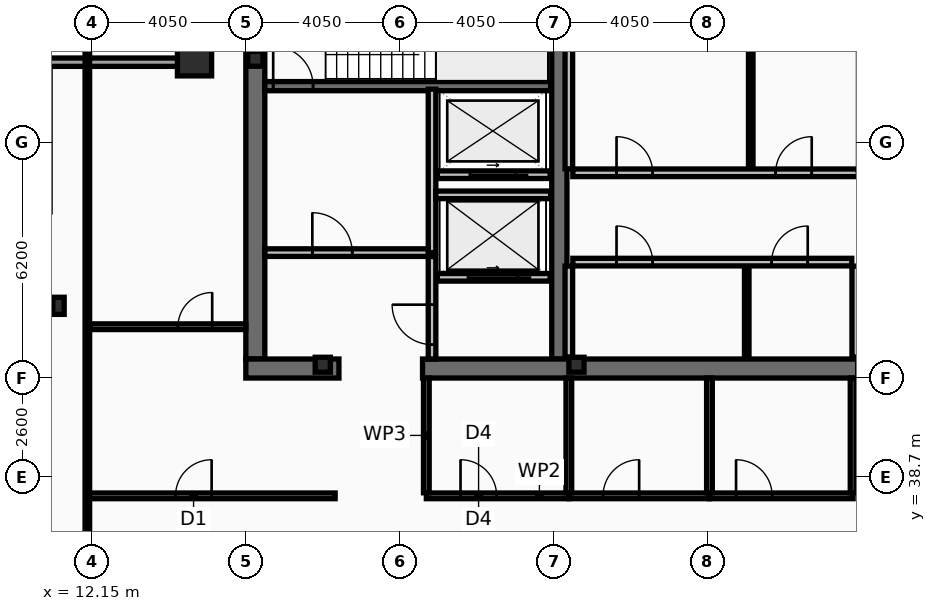
"""IFC4 building model, lengths in metres.
Left out: names, types, materials, properties, quantities, classifications, styles, units other than length and angle.
Written with IfcOpenShell. Run it as: python <this file> out.ifc"""

import sys

from ifc_helpers import new_model, si_unit, direction, frame, frame_2d, origin, origin_2d, place, context, subcontext, project, spatial, rectangle, hollow_rectangle, i_section, extrude, element, fill, save


model = new_model("IFC4")
c1 = context("Model", 3, precision=1e-05, world=origin(), true_north=direction((0.0, 1.0)))
c2 = subcontext(c1, "Body", "Model", "MODEL_VIEW")
j1 = project(units=[si_unit("LENGTHUNIT", "METRE"), si_unit("PLANEANGLEUNIT", "RADIAN")], contexts=[c1])
p1 = place(None, origin())
s1 = spatial("IfcSite", under=j1, at=p1, CompositionType="ELEMENT")
p2 = place(p1, origin())
s2 = spatial("IfcBuilding", under=s1, at=p2, CompositionType="ELEMENT")
p3 = place(p2, frame((0.0, 0.0, 314.6)))
s3 = spatial("IfcBuildingStorey", under=s2, at=p3, CompositionType="ELEMENT", Elevation=314.6)
p4 = place(p3, frame((16.45, 41.8, 0.0), z_axis=(0.0, 0.0, 1.0), x_axis=(0.0, 1.0, 0.0)))
e1 = element("IfcWall", 1, at=p4, inside=s3, PredefinedType="SHEAR", context=c2, shape_type="SweptSolid", body=[
    extrude(rectangle(XDim=11.4, YDim=0.5, at=frame_2d((5.7, 0.0))), origin(), (0.0, 0.0, 1.0), 3.44),
])
p5 = place(p3, frame((24.45, 41.8, 0.0), z_axis=(0.0, 0.0, 1.0), x_axis=(0.0, 1.0, 0.0)))
e2 = element("IfcWall", 2, at=p5, inside=s3, PredefinedType="SHEAR", context=c2, shape_type="SweptSolid", body=[
    extrude(rectangle(XDim=11.4, YDim=0.4, at=frame_2d((5.7, 0.0))), origin(), (0.0, 0.0, 1.0), 3.44),
])
p6 = place(p3, frame((18.65, 41.55, 0.0), z_axis=(0.0, 0.0, 1.0), x_axis=(-1.0, 0.0, 0.0)))
e3 = element("IfcWall", 3, at=p6, inside=s3, PredefinedType="SHEAR", context=c2, shape_type="SweptSolid", body=[
    extrude(rectangle(XDim=2.45, YDim=0.5, at=frame_2d((1.225, 0.0))), origin(), (0.0, 0.0, 1.0), 3.44),
])
p7 = place(p3, frame((32.3, 41.55, 0.0), z_axis=(0.0, 0.0, 1.0), x_axis=(-1.0, 0.0, 0.0)))
e4 = element("IfcWall", 4, at=p7, inside=s3, PredefinedType="SHEAR", context=c2, shape_type="SweptSolid", body=[
    extrude(rectangle(XDim=11.45, YDim=0.5, at=frame_2d((5.725, 0.0))), origin(), (0.0, 0.0, 1.0), 3.44),
])
p8 = place(p3, frame((16.7, 48.98, 0.0), z_axis=(0.0, 0.0, 1.0), x_axis=(1.0, 0.0, 0.0)))
e5 = element("IfcWall", 5, at=p8, inside=s3, PredefinedType="SHEAR", context=c2, shape_type="SweptSolid", body=[
    extrude(rectangle(XDim=7.52, YDim=0.24, at=frame_2d((3.76, 0.0))), origin(), (0.0, 0.0, 1.0), 3.44),
])
p9 = place(p8, frame((0.22, 0.0, 0.0)))
e6 = element("IfcOpeningElement", 6, at=p9, cuts=e5, PredefinedType="OPENING", context=c2, shape_type="SweptSolid", body=[
    extrude(rectangle(XDim=1.05, YDim=2.15, at=frame_2d((0.525, 1.075))), frame((0.0, 0.13, 0.0), z_axis=(0.0, -1.0, 0.0), x_axis=(1.0, 0.0, 0.0)), (0.0, 0.0, 1.0), 0.26),
])
p10 = place(p3, frame((14.85, 49.7, 0.0), z_axis=(0.0, 0.0, 1.0), x_axis=(1.0, 0.0, 0.0)))
e7 = element("IfcColumn", 7, at=p10, inside=s3, PredefinedType="COLUMN", context=c2, shape_type="SweptSolid", body=[
    extrude(hollow_rectangle(XDim=0.9, YDim=0.9, WallThickness=0.05, at=origin_2d()), origin(), (0.0, 0.0, 1.0), 3.6),
])
p11 = place(p3, frame((11.27, 43.2, 0.0), z_axis=(0.0, 0.0, 1.0), x_axis=(1.0, 0.0, 0.0)))
e8 = element("IfcColumn", 8, at=p11, inside=s3, PredefinedType="COLUMN", context=c2, shape_type="SweptSolid", body=[
    extrude(i_section(OverallWidth=0.3, OverallDepth=0.45, WebThickness=0.014, FlangeThickness=0.026, at=origin_2d()), origin(), (0.0, 0.0, 1.0), 3.6),
])
for number, where, z_axis, x_axis in (
    (9, (16.45, 49.7, 0.0), (0.0, 0.0, 1.0), (1.0, 0.0, 0.0)),
    (10, (18.225, 41.65, 0.0), (0.0, 0.0, 1.0), (1.0, 0.0, 0.0)),
    (11, (24.9, 41.65, 0.0), (0.0, 0.0, 1.0), (1.0, 0.0, 0.0)),
):
    element("IfcColumn", number, at=place(p3, frame(where, z_axis=z_axis, x_axis=x_axis)), inside=s3, PredefinedType="COLUMN", context=c2, shape_type="SweptSolid", body=[
        extrude(i_section(OverallWidth=0.399, OverallDepth=0.393, WebThickness=0.023, FlangeThickness=0.037, at=origin_2d()), origin(), (0.0, 0.0, 1.0), 3.6),
    ])
p12 = place(p3, frame((10.83, 49.61, 0.0), z_axis=(0.0, 0.0, 1.0), x_axis=(1.0, 0.0, 0.0)))
e12 = element("IfcWall", 12, at=p12, inside=s3, PredefinedType="SOLIDWALL", context=c2, shape_type="SweptSolid", body=[
    extrude(rectangle(XDim=4.22, YDim=0.22, at=frame_2d((2.11, 0.0))), origin(), (0.0, 0.0, 1.0), 2.88),
])
p13 = place(p3, frame((14.94, 49.72, 0.0), z_axis=(0.0, 0.0, 1.0), x_axis=(0.0, 1.0, 0.0)))
e13 = element("IfcWall", 13, at=p13, inside=s3, PredefinedType="SOLIDWALL", context=c2, shape_type="SweptSolid", body=[
    extrude(rectangle(XDim=3.91, YDim=0.22, at=frame_2d((1.955, 0.0))), origin(), (0.0, 0.0, 1.0), 2.88),
])
p14 = place(p3, frame((24.21, 43.95, 0.0), z_axis=(0.0, 0.0, 1.0), x_axis=(-1.0, 0.0, 0.0)))
e14 = element("IfcWall", 14, at=p14, inside=s3, PredefinedType="PARTITIONING", context=c2, shape_type="SweptSolid", body=[
    extrude(rectangle(XDim=2.97, YDim=0.2, at=frame_2d((1.485, 0.0))), origin(), (0.0, 0.0, 1.0), 3.44),
])
p15 = place(p14, frame((0.86, 0.0, 0.0)))
e15 = element("IfcOpeningElement", 15, at=p15, cuts=e14, PredefinedType="OPENING", context=c2, shape_type="SweptSolid", body=[
    extrude(rectangle(XDim=1.3, YDim=2.18, at=frame_2d((0.65, 1.09))), frame((0.0, 0.11, 0.0), z_axis=(0.0, -1.0, 0.0), x_axis=(1.0, 0.0, 0.0)), (0.0, 0.0, 1.0), 0.22),
])
p16 = place(p3, frame((24.21, 46.65, 0.0), z_axis=(0.0, 0.0, 1.0), x_axis=(-1.0, 0.0, 0.0)))
e16 = element("IfcWall", 16, at=p16, inside=s3, PredefinedType="PARTITIONING", context=c2, shape_type="SweptSolid", body=[
    extrude(rectangle(XDim=2.97, YDim=0.2, at=frame_2d((1.485, 0.0))), origin(), (0.0, 0.0, 1.0), 3.44),
])
p17 = place(p16, frame((0.91, 0.0, 0.0)))
e17 = element("IfcOpeningElement", 17, at=p17, cuts=e16, PredefinedType="OPENING", context=c2, shape_type="SweptSolid", body=[
    extrude(rectangle(XDim=1.2, YDim=2.18, at=frame_2d((0.6, 1.09))), frame((0.0, 0.11, 0.0), z_axis=(0.0, -1.0, 0.0), x_axis=(1.0, 0.0, 0.0)), (0.0, 0.0, 1.0), 0.22),
])
p18 = place(p3, frame((21.1, 44.6, 0.0), z_axis=(0.0, 0.0, 1.0), x_axis=(0.0, 1.0, 0.0)))
e18 = element("IfcWall", 18, at=p18, inside=s3, PredefinedType="PARTITIONING", context=c2, shape_type="SweptSolid", body=[
    extrude(rectangle(XDim=4.3, YDim=0.2, at=frame_2d((2.15, 0.0))), origin(), (0.0, 0.0, 1.0), 3.44),
])
p19 = place(p3, frame((16.7, 44.6, 0.0), z_axis=(0.0, 0.0, 1.0), x_axis=(1.0, 0.0, 0.0)))
e19 = element("IfcWall", 19, at=p19, inside=s3, PredefinedType="PARTITIONING", context=c2, shape_type="SweptSolid", body=[
    extrude(rectangle(XDim=4.3, YDim=0.2, at=frame_2d((2.15, 0.0))), origin(), (0.0, 0.0, 1.0), 3.44),
])
p20 = place(p19, frame((1.25, 0.0, 0.0)))
e20 = element("IfcOpeningElement", 20, at=p20, cuts=e19, PredefinedType="OPENING", context=c2, shape_type="SweptSolid", body=[
    extrude(rectangle(XDim=1.05, YDim=2.15, at=frame_2d((0.525, 1.075))), frame((0.0, 0.11, 0.0), z_axis=(0.0, -1.0, 0.0), x_axis=(1.0, 0.0, 0.0)), (0.0, 0.0, 1.0), 0.22),
])
p21 = place(p3, frame((21.2, 46.12, 0.0), z_axis=(0.0, 0.0, 1.0), x_axis=(1.0, 0.0, 0.0)))
e21 = element("IfcWall", 21, at=p21, inside=s3, PredefinedType="PARTITIONING", context=c2, shape_type="SweptSolid", body=[
    extrude(rectangle(XDim=3.02, YDim=0.2, at=frame_2d((1.51, 0.0))), origin(), (0.0, 0.0, 1.0), 3.44),
])
p22 = place(p3, frame((21.1, 41.8, 0.0), z_axis=(0.0, 0.0, 1.0), x_axis=(0.0, 1.0, 0.0)))
e22 = element("IfcWall", 22, at=p22, inside=s3, PredefinedType="PARTITIONING", context=c2, shape_type="SweptSolid", body=[
    extrude(rectangle(XDim=2.695, YDim=0.2, at=frame_2d((1.348, 0.0))), origin(), (0.0, 0.0, 1.0), 3.44),
])
p23 = place(p22, frame((0.38, 0.0, 0.0)))
e23 = element("IfcOpeningElement", 23, at=p23, cuts=e22, PredefinedType="OPENING", context=c2, shape_type="SweptSolid", body=[
    extrude(rectangle(XDim=1.05, YDim=2.15, at=frame_2d((0.525, 1.075))), frame((0.0, 0.11, 0.0), z_axis=(0.0, -1.0, 0.0), x_axis=(1.0, 0.0, 0.0)), (0.0, 0.0, 1.0), 0.22),
])
p24 = place(p3, frame((24.7, 46.805, 0.0), z_axis=(0.0, 0.0, 1.0), x_axis=(0.0, 1.0, 0.0)))
e24 = element("IfcWall", 24, at=p24, inside=s3, PredefinedType="PARTITIONING", context=c2, shape_type="SweptSolid", body=[
    extrude(rectangle(XDim=5.99, YDim=0.2, at=frame_2d((2.995, 0.0))), origin(), (0.0, 0.0, 1.0), 3.44),
])
p25 = place(p3, frame((29.486, 46.805, 0.0), z_axis=(0.0, 0.0, 1.0), x_axis=(0.0, 1.0, 0.0)))
e25 = element("IfcWall", 25, at=p25, inside=s3, PredefinedType="PARTITIONING", context=c2, shape_type="SweptSolid", body=[
    extrude(rectangle(XDim=5.99, YDim=0.12, at=frame_2d((2.995, 0.0))), origin(), (0.0, 0.0, 1.0), 3.44),
])
p26 = place(p3, frame((24.805, 46.7, 0.0), z_axis=(0.0, 0.0, 1.0), x_axis=(1.0, 0.0, 0.0)))
e26 = element("IfcWall", 26, at=p26, inside=s3, PredefinedType="PARTITIONING", context=c2, shape_type="SweptSolid", body=[
    extrude(rectangle(XDim=7.51, YDim=0.2, at=frame_2d((3.755, 0.0))), origin(), (0.0, 0.0, 1.0), 3.44),
])
p27 = place(p26, frame((1.15, 0.0, 0.0)))
e27 = element("IfcOpeningElement", 27, at=p27, cuts=e26, PredefinedType="OPENING", context=c2, shape_type="SweptSolid", body=[
    extrude(rectangle(XDim=0.95, YDim=2.1, at=frame_2d((0.475, 1.05))), frame((0.0, 0.11, 0.0), z_axis=(0.0, -1.0, 0.0), x_axis=(1.0, 0.0, 0.0)), (0.0, 0.0, 1.0), 0.22),
])
p28 = place(p26, frame((5.336, 0.0, 0.0)))
e28 = element("IfcOpeningElement", 28, at=p28, cuts=e26, PredefinedType="OPENING", context=c2, shape_type="SweptSolid", body=[
    extrude(rectangle(XDim=0.95, YDim=2.1, at=frame_2d((0.475, 1.05))), frame((0.0, 0.11, 0.0), z_axis=(0.0, -1.0, 0.0), x_axis=(1.0, 0.0, 0.0)), (0.0, 0.0, 1.0), 0.22),
])
for number, where, z_axis, x_axis in (
    (29, (24.7, 41.85, 0.0), (0.0, 0.0, 1.0), (0.0, 1.0, 0.0)),
    (30, (32.25, 41.85, 0.0), (0.0, 0.0, 1.0), (0.0, 1.0, 0.0)),
):
    element("IfcWall", number, at=place(p3, frame(where, z_axis=z_axis, x_axis=x_axis)), inside=s3, PredefinedType="PARTITIONING", context=c2, shape_type="SweptSolid", body=[
        extrude(rectangle(XDim=2.395, YDim=0.2, at=frame_2d((1.198, 0.0))), origin(), (0.0, 0.0, 1.0), 3.44),
    ])
p29 = place(p3, frame((29.381, 41.85, 0.0), z_axis=(0.0, 0.0, 1.0), x_axis=(0.0, 1.0, 0.0)))
e31 = element("IfcWall", 31, at=p29, inside=s3, PredefinedType="PARTITIONING", context=c2, shape_type="SweptSolid", body=[
    extrude(rectangle(XDim=2.395, YDim=0.12, at=frame_2d((1.198, 0.0))), origin(), (0.0, 0.0, 1.0), 3.44),
])
p30 = place(p3, frame((24.805, 44.35, 0.0), z_axis=(0.0, 0.0, 1.0), x_axis=(1.0, 0.0, 0.0)))
e32 = element("IfcWall", 32, at=p30, inside=s3, PredefinedType="PARTITIONING", context=c2, shape_type="SweptSolid", body=[
    extrude(rectangle(XDim=7.34, YDim=0.2, at=frame_2d((3.67, 0.0))), origin(), (0.0, 0.0, 1.0), 3.44),
])
p31 = place(p30, frame((1.15, 0.0, 0.0)))
e33 = element("IfcOpeningElement", 33, at=p31, cuts=e32, PredefinedType="OPENING", context=c2, shape_type="SweptSolid", body=[
    extrude(rectangle(XDim=0.95, YDim=2.1, at=frame_2d((0.475, 1.05))), frame((0.0, 0.11, 0.0), z_axis=(0.0, -1.0, 0.0), x_axis=(1.0, 0.0, 0.0)), (0.0, 0.0, 1.0), 0.22),
])
p32 = place(p30, frame((5.231, 0.0, 0.0)))
e34 = element("IfcOpeningElement", 34, at=p32, cuts=e32, PredefinedType="OPENING", context=c2, shape_type="SweptSolid", body=[
    extrude(rectangle(XDim=0.95, YDim=2.1, at=frame_2d((0.475, 1.05))), frame((0.0, 0.11, 0.0), z_axis=(0.0, -1.0, 0.0), x_axis=(1.0, 0.0, 0.0)), (0.0, 0.0, 1.0), 0.22),
])
p33 = place(p3, frame((20.95, 38.2, 0.0), z_axis=(0.0, 0.0, 1.0), x_axis=(1.0, 0.0, 0.0)))
e35 = element("IfcWall", 35, at=p33, inside=s3, PredefinedType="PARTITIONING", context=c2, shape_type="SweptSolid", body=[
    extrude(rectangle(XDim=3.75, YDim=0.15, at=frame_2d((1.875, 0.0))), origin(), (0.0, 0.0, 1.0), 2.83),
])
p34 = place(p33, frame((0.9, 0.0, 0.0)))
e36 = element("IfcOpeningElement", 36, at=p34, cuts=e35, PredefinedType="OPENING", context=c2, shape_type="SweptSolid", body=[
    extrude(rectangle(XDim=0.95, YDim=2.05, at=frame_2d((0.475, 1.025))), frame((0.0, 0.085, 0.0), z_axis=(0.0, -1.0, 0.0), x_axis=(1.0, 0.0, 0.0)), (0.0, 0.0, 1.0), 0.17),
])
p35 = place(p3, frame((24.7, 38.2, 0.0), z_axis=(0.0, 0.0, 1.0), x_axis=(1.0, 0.0, 0.0)))
e37 = element("IfcWall", 37, at=p35, inside=s3, PredefinedType="PARTITIONING", context=c2, shape_type="SweptSolid", body=[
    extrude(rectangle(XDim=3.7, YDim=0.15, at=frame_2d((1.85, 0.0))), origin(), (0.0, 0.0, 1.0), 2.83),
])
p36 = place(p35, frame((0.9, 0.0, 0.0)))
e38 = element("IfcOpeningElement", 38, at=p36, cuts=e37, PredefinedType="OPENING", context=c2, shape_type="SweptSolid", body=[
    extrude(rectangle(XDim=0.95, YDim=2.05, at=frame_2d((0.475, 1.025))), frame((0.0, 0.085, 0.0), z_axis=(0.0, -1.0, 0.0), x_axis=(1.0, 0.0, 0.0)), (0.0, 0.0, 1.0), 0.17),
])
p37 = place(p3, frame((28.4, 38.2, 0.0), z_axis=(0.0, 0.0, 1.0), x_axis=(1.0, 0.0, 0.0)))
e39 = element("IfcWall", 39, at=p37, inside=s3, PredefinedType="PARTITIONING", context=c2, shape_type="SweptSolid", body=[
    extrude(rectangle(XDim=3.78, YDim=0.15, at=frame_2d((1.89, 0.0))), origin(), (0.0, 0.0, 1.0), 3.44),
])
p38 = place(p37, frame((0.7, 0.0, 0.0)))
e40 = element("IfcOpeningElement", 40, at=p38, cuts=e39, PredefinedType="OPENING", context=c2, shape_type="SweptSolid", body=[
    extrude(rectangle(XDim=0.95, YDim=2.05, at=frame_2d((0.475, 1.025))), frame((0.0, 0.085, 0.0), z_axis=(0.0, -1.0, 0.0), x_axis=(1.0, 0.0, 0.0)), (0.0, 0.0, 1.0), 0.17),
])
p39 = place(p3, frame((20.95, 38.28, 0.0), z_axis=(0.0, 0.0, 1.0), x_axis=(0.0, 1.0, 0.0)))
e41 = element("IfcWall", 41, at=p39, inside=s3, PredefinedType="PARTITIONING", context=c2, shape_type="SweptSolid", body=[
    extrude(rectangle(XDim=3.02, YDim=0.15, at=frame_2d((1.51, 0.0))), origin(), (0.0, 0.0, 1.0), 3.44),
])
p40 = place(p3, frame((24.7, 38.28, 0.0), z_axis=(0.0, 0.0, 1.0), x_axis=(0.0, 1.0, 0.0)))
e42 = element("IfcWall", 42, at=p40, inside=s3, PredefinedType="PARTITIONING", context=c2, shape_type="SweptSolid", body=[
    extrude(rectangle(XDim=3.02, YDim=0.15, at=frame_2d((1.51, 0.0))), origin(), (0.0, 0.0, 1.0), 2.83),
])
for number, where, z_axis, x_axis in (
    (43, (28.4, 38.28, 0.0), (0.0, 0.0, 1.0), (0.0, 1.0, 0.0)),
    (44, (32.18, 38.28, 0.0), (0.0, 0.0, 1.0), (0.0, 1.0, 0.0)),
):
    element("IfcWall", number, at=place(p3, frame(where, z_axis=z_axis, x_axis=x_axis)), inside=s3, PredefinedType="PARTITIONING", context=c2, shape_type="SweptSolid", body=[
        extrude(rectangle(XDim=3.02, YDim=0.15, at=frame_2d((1.51, 0.0))), origin(), (0.0, 0.0, 1.0), 3.44),
    ])
p41 = place(p3, frame((12.03, 38.2, 0.0), z_axis=(0.0, 0.0, 1.0), x_axis=(1.0, 0.0, 0.0)))
e45 = element("IfcWall", 45, at=p41, inside=s3, PredefinedType="PARTITIONING", context=c2, shape_type="SweptSolid", body=[
    extrude(rectangle(XDim=6.52, YDim=0.15, at=frame_2d((3.26, 0.0))), origin(), (0.0, 0.0, 1.0), 2.83),
])
p42 = place(p41, frame((2.32, 0.0, 0.0)))
e46 = element("IfcOpeningElement", 46, at=p42, cuts=e45, PredefinedType="OPENING", context=c2, shape_type="SweptSolid", body=[
    extrude(rectangle(XDim=0.95, YDim=2.05, at=frame_2d((0.475, 1.025))), frame((0.0, 0.085, 0.0), z_axis=(0.0, -1.0, 0.0), x_axis=(1.0, 0.0, 0.0)), (0.0, 0.0, 1.0), 0.17),
])
p43 = place(p3, frame((12.095, 42.65, 0.0), z_axis=(0.0, 0.0, 1.0), x_axis=(1.0, 0.0, 0.0)))
e47 = element("IfcWall", 47, at=p43, inside=s3, PredefinedType="PARTITIONING", context=c2, shape_type="SweptSolid", body=[
    extrude(rectangle(XDim=4.105, YDim=0.15, at=frame_2d((2.052, 0.0))), origin(), (0.0, 0.0, 1.0), 2.83),
])
p44 = place(p43, frame((2.32, 0.0, 0.0)))
e48 = element("IfcOpeningElement", 48, at=p44, cuts=e47, PredefinedType="OPENING", context=c2, shape_type="SweptSolid", body=[
    extrude(rectangle(XDim=0.9, YDim=2.05, at=frame_2d((0.45, 1.025))), frame((0.0, 0.085, 0.0), z_axis=(0.0, -1.0, 0.0), x_axis=(1.0, 0.0, 0.0)), (0.0, 0.0, 1.0), 0.17),
])
p45 = place(p3, frame((12.03, 10.665, 0.0), z_axis=(0.0, 0.0, 1.0), x_axis=(0.0, 1.0, 0.0)))
e49 = element("IfcWall", 49, at=p45, inside=s3, PredefinedType="PARTITIONING", context=c2, shape_type="SweptSolid", body=[
    extrude(rectangle(XDim=42.11, YDim=0.12, at=frame_2d((21.055, 0.0))), origin(), (0.0, 0.0, 1.0), 2.83),
])
p46 = place(p9, origin())
e50 = element("IfcDoor", 50, at=p46, inside=s3, OperationType="SINGLE_SWING_LEFT", PredefinedType="DOOR", context=c2, shape_type="SweptSolid", body=[
    extrude(rectangle(XDim=1.05, YDim=2.15, at=frame_2d((0.525, 1.075))), frame((0.0, 0.025, 0.0), z_axis=(0.0, -1.0, 0.0), x_axis=(1.0, 0.0, 0.0)), (0.0, 0.0, 1.0), 0.05),
])
fill(e6, e50)
p47 = place(p15, origin())
e51 = element("IfcDoor", 51, at=p47, inside=s3, OperationType="SLIDING_TO_LEFT", PredefinedType="DOOR", context=c2, shape_type="SweptSolid", body=[
    extrude(rectangle(XDim=1.3, YDim=2.18, at=frame_2d((0.65, 1.09))), frame((0.0, 0.025, 0.0), z_axis=(0.0, -1.0, 0.0), x_axis=(1.0, 0.0, 0.0)), (0.0, 0.0, 1.0), 0.05),
])
fill(e15, e51)
p48 = place(p17, origin())
e52 = element("IfcDoor", 52, at=p48, inside=s3, OperationType="SLIDING_TO_LEFT", PredefinedType="DOOR", context=c2, shape_type="SweptSolid", body=[
    extrude(rectangle(XDim=1.2, YDim=2.18, at=frame_2d((0.6, 1.09))), frame((0.0, 0.025, 0.0), z_axis=(0.0, -1.0, 0.0), x_axis=(1.0, 0.0, 0.0)), (0.0, 0.0, 1.0), 0.05),
])
fill(e17, e52)
p49 = place(p20, origin())
e53 = element("IfcDoor", 53, at=p49, inside=s3, OperationType="SINGLE_SWING_LEFT", PredefinedType="DOOR", context=c2, shape_type="SweptSolid", body=[
    extrude(rectangle(XDim=1.05, YDim=2.15, at=frame_2d((0.525, 1.075))), frame((0.0, 0.025, 0.0), z_axis=(0.0, -1.0, 0.0), x_axis=(1.0, 0.0, 0.0)), (0.0, 0.0, 1.0), 0.05),
])
fill(e20, e53)
p50 = place(p23, origin())
e54 = element("IfcDoor", 54, at=p50, inside=s3, OperationType="SINGLE_SWING_RIGHT", PredefinedType="DOOR", context=c2, shape_type="SweptSolid", body=[
    extrude(rectangle(XDim=1.05, YDim=2.15, at=frame_2d((0.525, 1.075))), frame((0.0, 0.025, 0.0), z_axis=(0.0, -1.0, 0.0), x_axis=(1.0, 0.0, 0.0)), (0.0, 0.0, 1.0), 0.05),
])
fill(e23, e54)
p51 = place(p27, origin())
e55 = element("IfcDoor", 55, at=p51, inside=s3, OperationType="SINGLE_SWING_LEFT", PredefinedType="DOOR", context=c2, shape_type="SweptSolid", body=[
    extrude(rectangle(XDim=0.95, YDim=2.1, at=frame_2d((0.475, 1.05))), frame((0.0, 0.025, 0.0), z_axis=(0.0, -1.0, 0.0), x_axis=(1.0, 0.0, 0.0)), (0.0, 0.0, 1.0), 0.05),
])
fill(e27, e55)
p52 = place(p28, origin())
e56 = element("IfcDoor", 56, at=p52, inside=s3, OperationType="SINGLE_SWING_RIGHT", PredefinedType="DOOR", context=c2, shape_type="SweptSolid", body=[
    extrude(rectangle(XDim=0.95, YDim=2.1, at=frame_2d((0.475, 1.05))), frame((0.0, 0.025, 0.0), z_axis=(0.0, -1.0, 0.0), x_axis=(1.0, 0.0, 0.0)), (0.0, 0.0, 1.0), 0.05),
])
fill(e28, e56)
p53 = place(p31, origin())
e57 = element("IfcDoor", 57, at=p53, inside=s3, OperationType="SINGLE_SWING_LEFT", PredefinedType="DOOR", context=c2, shape_type="SweptSolid", body=[
    extrude(rectangle(XDim=0.95, YDim=2.1, at=frame_2d((0.475, 1.05))), frame((0.0, 0.025, 0.0), z_axis=(0.0, -1.0, 0.0), x_axis=(1.0, 0.0, 0.0)), (0.0, 0.0, 1.0), 0.05),
])
fill(e33, e57)
p54 = place(p32, origin())
e58 = element("IfcDoor", 58, at=p54, inside=s3, OperationType="SINGLE_SWING_RIGHT", PredefinedType="DOOR", context=c2, shape_type="SweptSolid", body=[
    extrude(rectangle(XDim=0.95, YDim=2.1, at=frame_2d((0.475, 1.05))), frame((0.0, 0.025, 0.0), z_axis=(0.0, -1.0, 0.0), x_axis=(1.0, 0.0, 0.0)), (0.0, 0.0, 1.0), 0.05),
])
fill(e34, e58)
p55 = place(p34, origin())
e59 = element("IfcDoor", 59, at=p55, inside=s3, OperationType="SINGLE_SWING_LEFT", PredefinedType="DOOR", context=c2, shape_type="SweptSolid", body=[
    extrude(rectangle(XDim=0.95, YDim=2.05, at=frame_2d((0.475, 1.025))), frame((0.0, 0.025, 0.0), z_axis=(0.0, -1.0, 0.0), x_axis=(1.0, 0.0, 0.0)), (0.0, 0.0, 1.0), 0.05),
])
fill(e36, e59)
p56 = place(p36, origin())
e60 = element("IfcDoor", 60, at=p56, inside=s3, OperationType="SINGLE_SWING_RIGHT", PredefinedType="DOOR", context=c2, shape_type="SweptSolid", body=[
    extrude(rectangle(XDim=0.95, YDim=2.05, at=frame_2d((0.475, 1.025))), frame((0.0, 0.025, 0.0), z_axis=(0.0, -1.0, 0.0), x_axis=(1.0, 0.0, 0.0)), (0.0, 0.0, 1.0), 0.05),
])
fill(e38, e60)
p57 = place(p38, origin())
e61 = element("IfcDoor", 61, at=p57, inside=s3, OperationType="SINGLE_SWING_LEFT", PredefinedType="DOOR", context=c2, shape_type="SweptSolid", body=[
    extrude(rectangle(XDim=0.95, YDim=2.05, at=frame_2d((0.475, 1.025))), frame((0.0, 0.025, 0.0), z_axis=(0.0, -1.0, 0.0), x_axis=(1.0, 0.0, 0.0)), (0.0, 0.0, 1.0), 0.05),
])
fill(e40, e61)
p58 = place(p42, origin())
e62 = element("IfcDoor", 62, at=p58, inside=s3, OperationType="SINGLE_SWING_RIGHT", PredefinedType="DOOR", context=c2, shape_type="SweptSolid", body=[
    extrude(rectangle(XDim=0.95, YDim=2.05, at=frame_2d((0.475, 1.025))), frame((0.0, 0.025, 0.0), z_axis=(0.0, -1.0, 0.0), x_axis=(1.0, 0.0, 0.0)), (0.0, 0.0, 1.0), 0.05),
])
fill(e46, e62)
p59 = place(p44, origin())
e63 = element("IfcDoor", 63, at=p59, inside=s3, OperationType="SINGLE_SWING_RIGHT", PredefinedType="DOOR", context=c2, shape_type="SweptSolid", body=[
    extrude(rectangle(XDim=0.9, YDim=2.05, at=frame_2d((0.45, 1.025))), frame((0.0, 0.025, 0.0), z_axis=(0.0, -1.0, 0.0), x_axis=(1.0, 0.0, 0.0)), (0.0, 0.0, 1.0), 0.05),
])
fill(e48, e63)
save(model, sys.argv[1])
